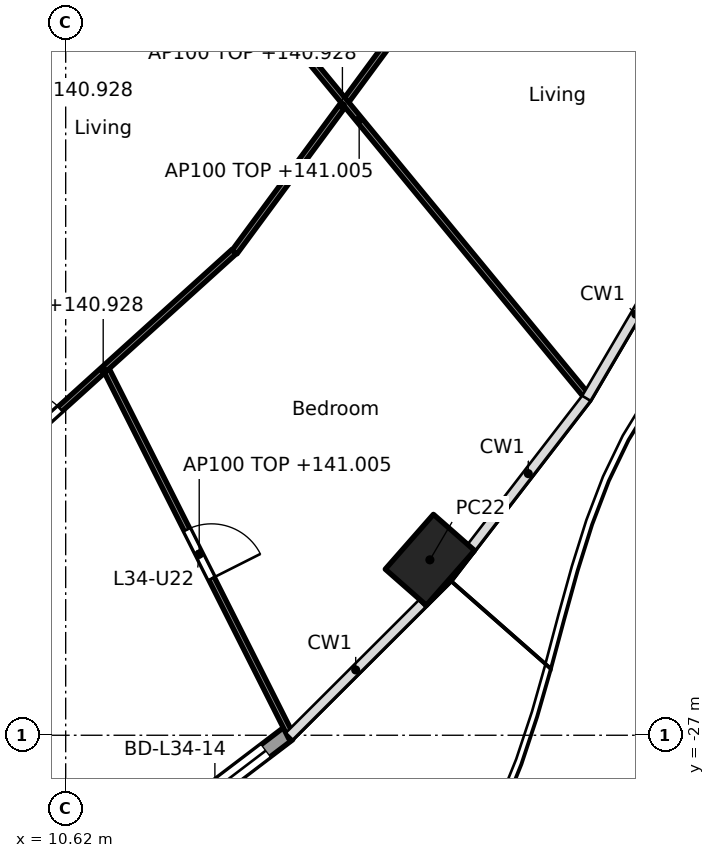
"""IFC4 building model, lengths in metres.
Left out: names, types, materials, properties, quantities, classifications, styles, units other than length and angle.
Written with IfcOpenShell. Run it as: python <this file> out.ifc"""

import sys

from ifc_helpers import new_model, si_unit, direction, frame, frame_2d, origin, origin_2d, place, context, subcontext, project, spatial, rectangle, hollow_rectangle, extrude, element, fill, save


model = new_model("IFC4")
c1 = context("Model", 3, precision=1e-05, world=origin(), true_north=direction((0.0, 1.0)))
c2 = subcontext(c1, "Body", "Model", "MODEL_VIEW")
j1 = project(units=[si_unit("LENGTHUNIT", "METRE"), si_unit("PLANEANGLEUNIT", "RADIAN")], contexts=[c1])
p1 = place(None, origin())
s1 = spatial("IfcSite", under=j1, at=p1, CompositionType="ELEMENT")
p2 = place(p1, origin())
s2 = spatial("IfcBuilding", under=s1, at=p2, CompositionType="ELEMENT")
p3 = place(p2, frame((0.0, 0.0, 138.1)))
s3 = spatial("IfcBuildingStorey", under=s2, at=p3, CompositionType="ELEMENT", Elevation=138.1)
p4 = place(p3, frame((16.61, -24.115, 0.0), z_axis=(0.0, 0.0, 1.0), x_axis=(0.660114607735, 0.751164898445, 0.0)))
e1 = element("IfcColumn", 1, at=p4, inside=s3, PredefinedType="COLUMN", context=c2, shape_type="SweptSolid", body=[
    extrude(hollow_rectangle(XDim=1.2, YDim=0.9, WallThickness=0.04, at=origin_2d()), origin(), (0.0, 0.0, 1.0), 3.7),
])
p5 = place(p3, frame((14.278, -26.973, 0.0), z_axis=(0.0, 0.0, 1.0), x_axis=(-0.796022231079, -0.605267385233, 0.0)))
e2 = element("IfcWall", 2, at=p5, inside=s3, PredefinedType="SOLIDWALL", context=c2, shape_type="SweptSolid", body=[
    extrude(rectangle(XDim=3.026, YDim=0.25, at=frame_2d((1.513, 0.0))), origin(), (0.0, 0.0, 1.0), 3.44),
])
p6 = place(p5, frame((0.463, 0.0, 0.0)))
e3 = element("IfcOpeningElement", 3, at=p6, cuts=e2, PredefinedType="OPENING", context=c2, shape_type="SweptSolid", body=[
    extrude(rectangle(XDim=2.1, YDim=2.4, at=frame_2d((1.05, 1.2))), frame((0.0, 0.135, 0.0), z_axis=(0.0, -1.0, 0.0), x_axis=(1.0, 0.0, 0.0)), (0.0, 0.0, 1.0), 0.27),
])
p7 = place(p3, frame((9.084, -22.941, 0.0), z_axis=(0.0, 0.0, 1.0), x_axis=(0.741684187175, 0.670749257543, 0.0)))
e4 = element("IfcWall", 4, at=p7, inside=s3, PredefinedType="PARTITIONING", context=c2, shape_type="SweptSolid", body=[
    extrude(rectangle(XDim=5.806, YDim=0.1, at=frame_2d((2.903, 0.0))), origin(), (0.0, 0.0, 1.0), 2.828),
])
p8 = place(p7, frame((1.052, 0.0, 0.0)))
e5 = element("IfcOpeningElement", 5, at=p8, cuts=e4, PredefinedType="OPENING", context=c2, shape_type="SweptSolid", body=[
    extrude(rectangle(XDim=0.9, YDim=2.1, at=frame_2d((0.45, 1.05))), frame((0.0, 0.06, 0.0), z_axis=(0.0, -1.0, 0.0), x_axis=(1.0, 0.0, 0.0)), (0.0, 0.0, 1.0), 0.12),
])
p9 = place(p3, frame((11.296, -21.005, 0.0), z_axis=(0.0, 0.0, 1.0), x_axis=(0.44991509116, -0.893071335755, 0.0)))
e6 = element("IfcWall", 6, at=p9, inside=s3, PredefinedType="PARTITIONING", context=c2, shape_type="SweptSolid", body=[
    extrude(rectangle(XDim=6.755, YDim=0.1, at=frame_2d((3.377, 0.0))), origin(), (0.0, 0.0, 1.0), 2.905),
])
p10 = place(p9, frame((2.927, 0.0, 0.0)))
e7 = element("IfcOpeningElement", 7, at=p10, cuts=e6, PredefinedType="OPENING", context=c2, shape_type="SweptSolid", body=[
    extrude(rectangle(XDim=0.9, YDim=2.1, at=frame_2d((0.45, 1.05))), frame((0.0, 0.06, 0.0), z_axis=(0.0, -1.0, 0.0), x_axis=(1.0, 0.0, 0.0)), (0.0, 0.0, 1.0), 0.12),
])
p11 = place(p3, frame((13.397, -19.053, 0.0), z_axis=(0.0, 0.0, 1.0), x_axis=(0.593522299069, 0.804817544856, 0.0)))
e8 = element("IfcWall", 8, at=p11, inside=s3, PredefinedType="PARTITIONING", context=c2, shape_type="SweptSolid", body=[
    extrude(rectangle(XDim=5.976, YDim=0.1, at=frame_2d((2.988, 0.0))), origin(), (0.0, 0.0, 1.0), 2.828),
])
p12 = place(p3, frame((11.667, -12.287, 0.0), z_axis=(0.0, 0.0, 1.0), x_axis=(0.635618027424, -0.772003706736, 0.0)))
e9 = element("IfcWall", 9, at=p12, inside=s3, PredefinedType="PARTITIONING", context=c2, shape_type="SweptSolid", body=[
    extrude(rectangle(XDim=11.893, YDim=0.1, at=frame_2d((5.947, 0.0))), origin(), (0.0, 0.0, 1.0), 2.905),
])
p13 = place(p12, frame((2.341, 0.0, 0.0)))
e10 = element("IfcOpeningElement", 10, at=p13, cuts=e9, PredefinedType="OPENING", context=c2, shape_type="SweptSolid", body=[
    extrude(rectangle(XDim=0.9, YDim=2.1, at=frame_2d((0.45, 1.05))), frame((0.0, 0.06, 0.0), z_axis=(0.0, -1.0, 0.0), x_axis=(1.0, 0.0, 0.0)), (0.0, 0.0, 1.0), 0.12),
])
p14 = place(p6, origin())
e11 = element("IfcDoor", 11, at=p14, inside=s3, OperationType="SLIDING_TO_LEFT", PredefinedType="DOOR", context=c2, shape_type="SweptSolid", body=[
    extrude(rectangle(XDim=2.1, YDim=2.4, at=frame_2d((1.05, 1.2))), frame((0.0, 0.025, 0.0), z_axis=(0.0, -1.0, 0.0), x_axis=(1.0, 0.0, 0.0)), (0.0, 0.0, 1.0), 0.05),
])
fill(e3, e11)
p15 = place(p10, origin())
e12 = element("IfcDoor", 12, at=p15, inside=s3, OperationType="SINGLE_SWING_RIGHT", PredefinedType="DOOR", context=c2, shape_type="SweptSolid", body=[
    extrude(rectangle(XDim=0.9, YDim=2.1, at=frame_2d((0.45, 1.05))), frame((0.0, 0.025, 0.0), z_axis=(0.0, -1.0, 0.0), x_axis=(1.0, 0.0, 0.0)), (0.0, 0.0, 1.0), 0.05),
])
fill(e7, e12)
p16 = place(p8, origin())
e13 = element("IfcDoor", 13, at=p16, inside=s3, OperationType="SINGLE_SWING_LEFT", PredefinedType="DOOR", context=c2, shape_type="SweptSolid", body=[
    extrude(rectangle(XDim=0.9, YDim=2.1, at=frame_2d((0.45, 1.05))), frame((0.0, 0.025, 0.0), z_axis=(0.0, -1.0, 0.0), x_axis=(1.0, 0.0, 0.0)), (0.0, 0.0, 1.0), 0.05),
])
fill(e5, e13)
save(model, sys.argv[1])
